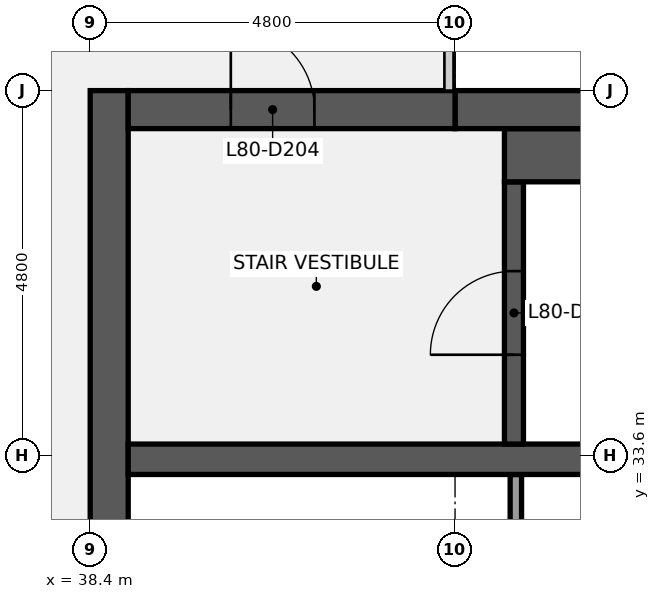
"""IFC4 building model, lengths in metres.
Left out: names, types, materials, properties, quantities, classifications, styles, units other than length and angle.
Written with IfcOpenShell. Run it as: python <this file> out.ifc"""

import sys

from ifc_helpers import new_model, si_unit, direction, frame, frame_2d, origin, place, context, subcontext, project, spatial, rectangle, extrude, element, fill, save


model = new_model("IFC4")
c1 = context("Model", 3, precision=1e-05, world=origin(), true_north=direction((0.0, 1.0)))
c2 = subcontext(c1, "Body", "Model", "MODEL_VIEW")
j1 = project(units=[si_unit("LENGTHUNIT", "METRE"), si_unit("PLANEANGLEUNIT", "RADIAN")], contexts=[c1])
p1 = place(None, origin())
s1 = spatial("IfcSite", under=j1, at=p1, CompositionType="ELEMENT")
p2 = place(p1, origin())
s2 = spatial("IfcBuilding", under=s1, at=p2, CompositionType="ELEMENT")
p3 = place(p2, frame((0.0, 0.0, 358.3)))
s3 = spatial("IfcBuildingStorey", under=s2, at=p3, CompositionType="ELEMENT", Elevation=358.3)
p4 = place(p3, frame((38.65, 9.6, 0.0), z_axis=(0.0, 0.0, 1.0), x_axis=(0.0, 1.0, 0.0)))
e1 = element("IfcWall", 1, at=p4, inside=s3, PredefinedType="SHEAR", context=c2, shape_type="SweptSolid", body=[
    extrude(rectangle(XDim=28.8, YDim=0.5, at=frame_2d((14.4, 0.0))), origin(), (0.0, 0.0, 1.0), 3.75),
])
p5 = place(p4, frame((8.7, 0.0, 0.0)))
e2 = element("IfcOpeningElement", 2, at=p5, cuts=e1, PredefinedType="OPENING", context=c2, shape_type="SweptSolid", body=[
    extrude(rectangle(XDim=1.8, YDim=2.1, at=frame_2d((0.9, 1.05))), frame((0.0, 0.26, 0.0), z_axis=(0.0, -1.0, 0.0), x_axis=(1.0, 0.0, 0.0)), (0.0, 0.0, 1.0), 0.52),
])
p6 = place(p4, frame((18.3, 0.0, 0.0)))
e3 = element("IfcOpeningElement", 3, at=p6, cuts=e1, PredefinedType="OPENING", context=c2, shape_type="SweptSolid", body=[
    extrude(rectangle(XDim=1.8, YDim=2.1, at=frame_2d((0.9, 1.05))), frame((0.0, 0.26, 0.0), z_axis=(0.0, -1.0, 0.0), x_axis=(1.0, 0.0, 0.0)), (0.0, 0.0, 1.0), 0.52),
])
p7 = place(p3, frame((44.0, 30.75, 0.0), z_axis=(0.0, 0.0, 1.0), x_axis=(0.0, 1.0, 0.0)))
e4 = element("IfcWall", 4, at=p7, inside=s3, PredefinedType="PARTITIONING", context=c2, shape_type="SweptSolid", body=[
    extrude(rectangle(XDim=2.6, YDim=0.15, at=frame_2d((1.3, 0.0))), origin(), (0.0, 0.0, 1.0), 3.75),
])
p8 = place(p3, frame((38.9, 33.55, 0.0), z_axis=(0.0, 0.0, 1.0), x_axis=(1.0, 0.0, 0.0)))
e5 = element("IfcWall", 5, at=p8, inside=s3, PredefinedType="SHEAR", context=c2, shape_type="SweptSolid", body=[
    extrude(rectangle(XDim=18.2, YDim=0.4, at=frame_2d((9.1, 0.0))), origin(), (0.0, 0.0, 1.0), 3.75),
])
p9 = place(p3, frame((43.975, 33.75, 0.0), z_axis=(0.0, 0.0, 1.0), x_axis=(0.0, 1.0, 0.0)))
e6 = element("IfcWall", 6, at=p9, inside=s3, PredefinedType="SHEAR", context=c2, shape_type="SweptSolid", body=[
    extrude(rectangle(XDim=3.45, YDim=0.25, at=frame_2d((1.725, 0.0))), origin(), (0.0, 0.0, 1.0), 3.75),
])
p10 = place(p9, frame((1.175, 0.0, 0.0)))
e7 = element("IfcOpeningElement", 7, at=p10, cuts=e6, PredefinedType="OPENING", context=c2, shape_type="SweptSolid", body=[
    extrude(rectangle(XDim=1.1, YDim=2.1, at=frame_2d((0.55, 1.05))), frame((0.0, 0.135, 0.0), z_axis=(0.0, -1.0, 0.0), x_axis=(1.0, 0.0, 0.0)), (0.0, 0.0, 1.0), 0.27),
])
p11 = place(p3, frame((43.85, 37.55, 0.0), z_axis=(0.0, 0.0, 1.0), x_axis=(1.0, 0.0, 0.0)))
e8 = element("IfcWall", 8, at=p11, inside=s3, PredefinedType="SHEAR", context=c2, shape_type="SweptSolid", body=[
    extrude(rectangle(XDim=7.5, YDim=0.7, at=frame_2d((3.75, 0.0))), origin(), (0.0, 0.0, 1.0), 3.75),
])
p12 = place(p3, frame((43.2, 38.15, 0.0), z_axis=(0.0, 0.0, 1.0), x_axis=(1.0, 0.0, 0.0)))
e9 = element("IfcWall", 9, at=p12, inside=s3, PredefinedType="SHEAR", context=c2, shape_type="SweptSolid", body=[
    extrude(rectangle(XDim=13.9, YDim=0.5, at=frame_2d((6.95, 0.0))), origin(), (0.0, 0.0, 1.0), 3.75),
])
p13 = place(p3, frame((38.9, 38.15, 0.0), z_axis=(0.0, 0.0, 1.0), x_axis=(1.0, 0.0, 0.0)))
e10 = element("IfcWall", 10, at=p13, inside=s3, PredefinedType="SHEAR", context=c2, shape_type="SweptSolid", body=[
    extrude(rectangle(XDim=4.3, YDim=0.5, at=frame_2d((2.15, 0.0))), origin(), (0.0, 0.0, 1.0), 3.75),
])
p14 = place(p13, frame((1.35, 0.0, 0.0)))
e11 = element("IfcOpeningElement", 11, at=p14, cuts=e10, PredefinedType="OPENING", context=c2, shape_type="SweptSolid", body=[
    extrude(rectangle(XDim=1.1, YDim=2.1, at=frame_2d((0.55, 1.05))), frame((0.0, 0.26, 0.0), z_axis=(0.0, -1.0, 0.0), x_axis=(1.0, 0.0, 0.0)), (0.0, 0.0, 1.0), 0.52),
])
p15 = place(p10, origin())
e12 = element("IfcDoor", 12, at=p15, inside=s3, OperationType="SINGLE_SWING_LEFT", PredefinedType="DOOR", context=c2, shape_type="SweptSolid", body=[
    extrude(rectangle(XDim=1.1, YDim=2.1, at=frame_2d((0.55, 1.05))), frame((0.0, 0.025, 0.0), z_axis=(0.0, -1.0, 0.0), x_axis=(1.0, 0.0, 0.0)), (0.0, 0.0, 1.0), 0.05),
])
fill(e7, e12)
p16 = place(p14, origin())
e13 = element("IfcDoor", 13, at=p16, inside=s3, OperationType="SINGLE_SWING_LEFT", PredefinedType="DOOR", context=c2, shape_type="SweptSolid", body=[
    extrude(rectangle(XDim=1.1, YDim=2.1, at=frame_2d((0.55, 1.05))), frame((0.0, 0.025, 0.0), z_axis=(0.0, -1.0, 0.0), x_axis=(1.0, 0.0, 0.0)), (0.0, 0.0, 1.0), 0.05),
])
fill(e11, e13)
save(model, sys.argv[1])
